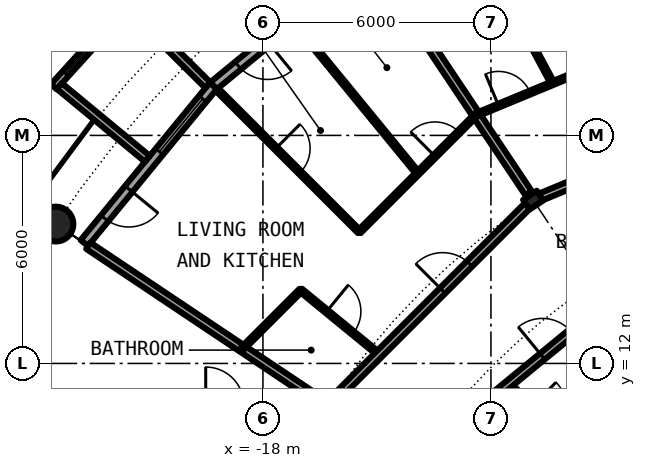
"""IFC4 building model, lengths in metres.
Left out: names, types, materials, properties, quantities, classifications, styles, units other than length and angle.
Written with IfcOpenShell. Run it as: python <this file> out.ifc"""

import sys

from ifc_helpers import new_model, si_unit, direction, frame, frame_2d, origin, origin_2d, place, context, subcontext, project, spatial, rectangle, circle, hollow_circle, i_section, extrude, element, fill, save


model = new_model("IFC4")
c1 = context("Model", 3, precision=1e-05, world=origin(), true_north=direction((0.0, 1.0)))
c2 = subcontext(c1, "Body", "Model", "MODEL_VIEW")
j1 = project(units=[si_unit("LENGTHUNIT", "METRE"), si_unit("PLANEANGLEUNIT", "RADIAN")], contexts=[c1])
p1 = place(None, origin())
s1 = spatial("IfcSite", under=j1, at=p1, CompositionType="ELEMENT")
p2 = place(p1, origin())
s2 = spatial("IfcBuilding", under=s1, at=p2, CompositionType="ELEMENT")
p3 = place(p2, frame((0.0, 0.0, 111.65)))
s3 = spatial("IfcBuildingStorey", under=s2, at=p3, CompositionType="ELEMENT", Elevation=111.65)
p4 = place(p3, frame((-23.448, 15.667, 0.0), z_axis=(0.0, 0.0, 1.0), x_axis=(1.0, 0.0, 0.0)))
e1 = element("IfcColumn", 1, at=p4, inside=s3, PredefinedType="COLUMN", context=c2, shape_type="SweptSolid", body=[
    extrude(hollow_circle(Radius=0.457, WallThickness=0.04, at=origin_2d()), origin(), (0.0, 0.0, 1.0), 3.05),
])
p5 = place(p3, frame((-10.889, 16.297, 0.0), z_axis=(0.0, 0.0, 1.0), x_axis=(-0.55557023302, 0.831469612303, 0.0)))
e2 = element("IfcColumn", 2, at=p5, inside=s3, PredefinedType="COLUMN", context=c2, shape_type="SweptSolid", body=[
    extrude(i_section(OverallWidth=0.307, OverallDepth=0.432, WebThickness=0.021, FlangeThickness=0.04, FilletRadius=0.027, at=origin_2d()), origin(), (0.0, 0.0, 1.0), 3.05),
])
p6 = place(p3, frame((-15.167, 22.699, 0.0), z_axis=(0.0, 0.0, 1.0), x_axis=(-0.773019449054, -0.634382322723, 0.0)))
e3 = element("IfcWall", 3, at=p6, inside=s3, PredefinedType="SOLIDWALL", context=c2, shape_type="SweptSolid", body=[
    extrude(rectangle(XDim=5.352, YDim=0.25, at=frame_2d((2.676, 0.0))), origin(), (0.0, 0.0, 1.0), 2.7),
])
p7 = place(p6, frame((0.441, 0.0, 0.3)))
e4 = element("IfcOpeningElement", 4, at=p7, cuts=e3, PredefinedType="OPENING", context=c2, shape_type="SweptSolid", body=[
    extrude(rectangle(XDim=1.8, YDim=2.1, at=frame_2d((0.9, 1.05))), frame((0.0, 0.135, 0.0), z_axis=(0.0, -1.0, 0.0), x_axis=(1.0, 0.0, 0.0)), (0.0, 0.0, 1.0), 0.27),
])
p8 = place(p6, frame((3.51, 0.0, 0.0)))
e5 = element("IfcOpeningElement", 5, at=p8, cuts=e3, PredefinedType="OPENING", context=c2, shape_type="SweptSolid", body=[
    extrude(rectangle(XDim=1.0, YDim=2.2, at=frame_2d((0.5, 1.1))), frame((0.0, 0.135, 0.0), z_axis=(0.0, -1.0, 0.0), x_axis=(1.0, 0.0, 0.0)), (0.0, 0.0, 1.0), 0.27),
])
p9 = place(p3, frame((-19.304, 19.304, 0.0), z_axis=(0.0, 0.0, 1.0), x_axis=(-0.634382322723, -0.773019449054, 0.0)))
e6 = element("IfcWall", 6, at=p9, inside=s3, PredefinedType="SOLIDWALL", context=c2, shape_type="SweptSolid", body=[
    extrude(rectangle(XDim=5.352, YDim=0.25, at=frame_2d((2.676, 0.0))), origin(), (0.0, 0.0, 1.0), 2.7),
])
p10 = place(p9, frame((0.441, 0.0, 0.3)))
e7 = element("IfcOpeningElement", 7, at=p10, cuts=e6, PredefinedType="OPENING", context=c2, shape_type="SweptSolid", body=[
    extrude(rectangle(XDim=1.8, YDim=2.1, at=frame_2d((0.9, 1.05))), frame((0.0, 0.135, 0.0), z_axis=(0.0, -1.0, 0.0), x_axis=(1.0, 0.0, 0.0)), (0.0, 0.0, 1.0), 0.27),
])
p11 = place(p9, frame((3.51, 0.0, 0.0)))
e8 = element("IfcOpeningElement", 8, at=p11, cuts=e6, PredefinedType="OPENING", context=c2, shape_type="SweptSolid", body=[
    extrude(rectangle(XDim=1.0, YDim=2.2, at=frame_2d((0.5, 1.1))), frame((0.0, 0.135, 0.0), z_axis=(0.0, -1.0, 0.0), x_axis=(1.0, 0.0, 0.0)), (0.0, 0.0, 1.0), 0.27),
])
p12 = place(p3, frame((-21.493, 21.5, -0.03), z_axis=(0.0, 0.0, 1.0), x_axis=(-0.671506829416, -0.740998365753, 0.0)))
e9 = element("IfcWall", 9, at=p12, inside=s3, PredefinedType="SOLIDWALL", context=c2, shape_type="SweptSolid", body=[
    extrude(rectangle(XDim=2.993, YDim=0.2, at=frame_2d((1.497, 0.0))), origin(), (0.0, 0.0, 1.0), 2.73),
])
p13 = place(p12, frame((0.457, 0.0, 0.33)))
e10 = element("IfcOpeningElement", 10, at=p13, cuts=e9, PredefinedType="OPENING", context=c2, shape_type="SweptSolid", body=[
    extrude(circle(Radius=1.04, at=frame_2d((1.04, 1.04))), frame((0.0, 0.11, 0.0), z_axis=(0.0, -1.0, 0.0), x_axis=(1.0, 0.0, 0.0)), (0.0, 0.0, 1.0), 0.22),
])
p14 = place(p3, frame((-19.45, 19.323, -0.03), z_axis=(0.0, 0.0, 1.0), x_axis=(-0.709727076896, 0.704476739375, 0.0)))
e11 = element("IfcWall", 11, at=p14, inside=s3, PredefinedType="SOLIDWALL", context=c2, shape_type="SweptSolid", body=[
    extrude(rectangle(XDim=2.883, YDim=0.2, at=frame_2d((1.441, 0.0))), origin(), (0.0, 0.0, 1.0), 2.73),
])
p15 = place(p3, frame((-21.041, 17.384, -0.03), z_axis=(0.0, 0.0, 1.0), x_axis=(-0.770784861449, 0.63709551667, 0.0)))
e12 = element("IfcWall", 12, at=p15, inside=s3, PredefinedType="SOLIDWALL", context=c2, shape_type="SweptSolid", body=[
    extrude(rectangle(XDim=3.006, YDim=0.2, at=frame_2d((1.503, 0.0))), origin(), (0.0, 0.0, 1.0), 2.73),
])
p16 = place(p3, frame((-22.595, 15.098, 0.0), z_axis=(0.0, 0.0, 1.0), x_axis=(0.831406593008, -0.555664536482, 0.0)))
e13 = element("IfcWall", 13, at=p16, inside=s3, PredefinedType="PARTITIONING", context=c2, shape_type="SweptSolid", body=[
    extrude(rectangle(XDim=7.358, YDim=0.2, at=frame_2d((3.679, 0.0))), origin(), (0.0, 0.0, 1.0), 2.7),
])
p17 = place(p3, frame((-19.216, 19.216, 0.0), z_axis=(0.0, 0.0, 1.0), x_axis=(0.707106781187, -0.707106781187, 0.0)))
e14 = element("IfcWall", 14, at=p17, inside=s3, PredefinedType="PARTITIONING", context=c2, shape_type="SweptSolid", body=[
    extrude(rectangle(XDim=5.305, YDim=0.1, at=frame_2d((2.652, 0.0))), origin(), (0.0, 0.0, 1.0), 2.7),
])
p18 = place(p17, frame((2.202, 0.0, 0.0)))
e15 = element("IfcOpeningElement", 15, at=p18, cuts=e14, PredefinedType="OPENING", context=c2, shape_type="SweptSolid", body=[
    extrude(rectangle(XDim=0.9, YDim=2.3, at=frame_2d((0.45, 1.15))), frame((0.0, 0.06, 0.0), z_axis=(0.0, -1.0, 0.0), x_axis=(1.0, 0.0, 0.0)), (0.0, 0.0, 1.0), 0.12),
])
p19 = place(p3, frame((-17.22, 21.023, 0.0), z_axis=(0.0, 0.0, 1.0), x_axis=(0.633774976367, -0.773517471898, 0.0)))
e16 = element("IfcWall", 16, at=p19, inside=s3, PredefinedType="PARTITIONING", context=c2, shape_type="SweptSolid", body=[
    extrude(rectangle(XDim=5.196, YDim=0.1, at=frame_2d((2.598, 0.0))), origin(), (0.0, 0.0, 1.0), 2.7),
])
p20 = place(p3, frame((-17.004, 13.927, 0.0), z_axis=(0.0, 0.0, 1.0), x_axis=(0.77367517848, -0.633582447834, 0.0)))
e17 = element("IfcWall", 17, at=p20, inside=s3, PredefinedType="PARTITIONING", context=c2, shape_type="SweptSolid", body=[
    extrude(rectangle(XDim=2.661, YDim=0.1, at=frame_2d((1.331, 0.0))), origin(), (0.0, 0.0, 1.0), 2.7),
])
p21 = place(p20, frame((0.881, 0.0, 0.0)))
e18 = element("IfcOpeningElement", 18, at=p21, cuts=e17, PredefinedType="OPENING", context=c2, shape_type="SweptSolid", body=[
    extrude(rectangle(XDim=0.9, YDim=2.3, at=frame_2d((0.45, 1.15))), frame((0.0, 0.06, 0.0), z_axis=(0.0, -1.0, 0.0), x_axis=(1.0, 0.0, 0.0)), (0.0, 0.0, 1.0), 0.12),
])
p22 = place(p3, frame((-15.097, 22.595, 0.0), z_axis=(0.0, 0.0, 1.0), x_axis=(0.555572791, -0.831467903109, 0.0)))
e19 = element("IfcWall", 19, at=p22, inside=s3, PredefinedType="PARTITIONING", context=c2, shape_type="SweptSolid", body=[
    extrude(rectangle(XDim=7.358, YDim=0.2, at=frame_2d((3.679, 0.0))), origin(), (0.0, 0.0, 1.0), 2.7),
])
p23 = place(p3, frame((-12.833, 23.954, 0.0), z_axis=(0.0, 0.0, 1.0), x_axis=(0.472148388886, -0.881519085938, 0.0)))
e20 = element("IfcWall", 20, at=p23, inside=s3, PredefinedType="PARTITIONING", context=c2, shape_type="SweptSolid", body=[
    extrude(rectangle(XDim=5.196, YDim=0.1, at=frame_2d((2.598, 0.0))), origin(), (0.0, 0.0, 1.0), 2.7),
])
p24 = place(p3, frame((-11.524, 11.464, 0.0), z_axis=(0.0, 0.0, 1.0), x_axis=(0.708796844581, -0.705412668665, 0.0)))
e21 = element("IfcWall", 21, at=p24, inside=s3, PredefinedType="PARTITIONING", context=c2, shape_type="SweptSolid", body=[
    extrude(rectangle(XDim=2.597, YDim=0.1, at=frame_2d((1.299, 0.0))), origin(), (0.0, 0.0, 1.0), 2.7),
])
p25 = place(p24, frame((0.849, 0.0, 0.0)))
e22 = element("IfcOpeningElement", 22, at=p25, cuts=e21, PredefinedType="OPENING", context=c2, shape_type="SweptSolid", body=[
    extrude(rectangle(XDim=0.9, YDim=2.3, at=frame_2d((0.45, 1.15))), frame((0.0, 0.06, 0.0), z_axis=(0.0, -1.0, 0.0), x_axis=(1.0, 0.0, 0.0)), (0.0, 0.0, 1.0), 0.12),
])
p26 = place(p3, frame((-14.052, 9.389, 0.0), z_axis=(0.0, 0.0, 1.0), x_axis=(0.77292501819, 0.634497372931, 0.0)))
e23 = element("IfcWall", 23, at=p26, inside=s3, PredefinedType="PARTITIONING", context=c2, shape_type="SweptSolid", body=[
    extrude(rectangle(XDim=9.81, YDim=0.2, at=frame_2d((4.905, 0.0))), origin(), (0.0, 0.0, 1.0), 2.7),
])
p27 = place(p26, frame((4.406, 0.0, 0.0)))
e24 = element("IfcOpeningElement", 24, at=p27, cuts=e23, PredefinedType="OPENING", context=c2, shape_type="SweptSolid", body=[
    extrude(rectangle(XDim=1.0, YDim=2.3, at=frame_2d((0.5, 1.15))), frame((0.0, 0.11, 0.0), z_axis=(0.0, -1.0, 0.0), x_axis=(1.0, 0.0, 0.0)), (0.0, 0.0, 1.0), 0.22),
])
p28 = place(p3, frame((-16.186, 11.0, 0.0), z_axis=(0.0, 0.0, 1.0), x_axis=(0.707106781187, 0.707106781187, 0.0)))
e25 = element("IfcWall", 25, at=p28, inside=s3, PredefinedType="PARTITIONING", context=c2, shape_type="SweptSolid", body=[
    extrude(rectangle(XDim=7.334, YDim=0.2, at=frame_2d((3.667, 0.0))), origin(), (0.0, 0.0, 1.0), 2.39),
])
p29 = place(p28, frame((4.123, 0.0, 0.0)))
e26 = element("IfcOpeningElement", 26, at=p29, cuts=e25, PredefinedType="OPENING", context=c2, shape_type="SweptSolid", body=[
    extrude(rectangle(XDim=1.0, YDim=2.3, at=frame_2d((0.5, 1.15))), frame((0.0, 0.11, 0.0), z_axis=(0.0, -1.0, 0.0), x_axis=(1.0, 0.0, 0.0)), (0.0, 0.0, 1.0), 0.22),
])
p30 = place(p3, frame((-10.745, 16.357, 0.0), z_axis=(0.0, 0.0, 1.0), x_axis=(0.923928411035, 0.382565407848, 0.0)))
e27 = element("IfcWall", 27, at=p30, inside=s3, PredefinedType="PARTITIONING", context=c2, shape_type="SweptSolid", body=[
    extrude(rectangle(XDim=7.335, YDim=0.2, at=frame_2d((3.667, 0.0))), origin(), (0.0, 0.0, 1.0), 2.39),
])
p31 = place(p30, frame((2.212, 0.0, 0.0)))
e28 = element("IfcOpeningElement", 28, at=p31, cuts=e27, PredefinedType="OPENING", context=c2, shape_type="SweptSolid", body=[
    extrude(rectangle(XDim=1.0, YDim=2.3, at=frame_2d((0.5, 1.15))), frame((0.0, 0.11, 0.0), z_axis=(0.0, -1.0, 0.0), x_axis=(1.0, 0.0, 0.0)), (0.0, 0.0, 1.0), 0.22),
])
p32 = place(p3, frame((-18.542, 12.389, 0.0), z_axis=(0.0, 0.0, 1.0), x_axis=(0.707106781187, 0.707106781187, 0.0)))
e29 = element("IfcWall", 29, at=p32, inside=s3, PredefinedType="PARTITIONING", context=c2, shape_type="SweptSolid", body=[
    extrude(rectangle(XDim=2.175, YDim=0.1, at=frame_2d((1.088, 0.0))), origin(), (0.0, 0.0, 1.0), 2.7),
])
p33 = place(p3, frame((-15.465, 15.465, 0.0), z_axis=(0.0, 0.0, 1.0), x_axis=(0.707022606819, 0.707190945535, 0.0)))
e30 = element("IfcWall", 30, at=p33, inside=s3, PredefinedType="PARTITIONING", context=c2, shape_type="SweptSolid", body=[
    extrude(rectangle(XDim=4.351, YDim=0.1, at=frame_2d((2.175, 0.0))), origin(), (0.0, 0.0, 1.0), 2.7),
])
p34 = place(p33, frame((2.813, 0.0, 0.0)))
e31 = element("IfcOpeningElement", 31, at=p34, cuts=e30, PredefinedType="OPENING", context=c2, shape_type="SweptSolid", body=[
    extrude(rectangle(XDim=0.9, YDim=2.3, at=frame_2d((0.45, 1.15))), frame((0.0, 0.06, 0.0), z_axis=(0.0, -1.0, 0.0), x_axis=(1.0, 0.0, 0.0)), (0.0, 0.0, 1.0), 0.12),
])
p35 = place(p3, frame((-12.397, 18.536, 0.0), z_axis=(0.0, 0.0, 1.0), x_axis=(0.923761942059, 0.382967197554, 0.0)))
e32 = element("IfcWall", 32, at=p35, inside=s3, PredefinedType="PARTITIONING", context=c2, shape_type="SweptSolid", body=[
    extrude(rectangle(XDim=4.356, YDim=0.1, at=frame_2d((2.178, 0.0))), origin(), (0.0, 0.0, 1.0), 2.7),
])
p36 = place(p35, frame((0.646, 0.0, 0.0)))
e33 = element("IfcOpeningElement", 33, at=p36, cuts=e32, PredefinedType="OPENING", context=c2, shape_type="SweptSolid", body=[
    extrude(rectangle(XDim=0.9, YDim=2.3, at=frame_2d((0.45, 1.15))), frame((0.0, 0.06, 0.0), z_axis=(0.0, -1.0, 0.0), x_axis=(1.0, 0.0, 0.0)), (0.0, 0.0, 1.0), 0.12),
])
p37 = place(p8, origin())
e34 = element("IfcDoor", 34, at=p37, inside=s3, OperationType="SINGLE_SWING_LEFT", PredefinedType="DOOR", context=c2, shape_type="SweptSolid", body=[
    extrude(rectangle(XDim=1.0, YDim=2.2, at=frame_2d((0.5, 1.1))), frame((0.0, 0.025, 0.0), z_axis=(0.0, -1.0, 0.0), x_axis=(1.0, 0.0, 0.0)), (0.0, 0.0, 1.0), 0.05),
])
fill(e5, e34)
p38 = place(p10, origin())
e35 = element("IfcWindow", 35, at=p38, inside=s3, PartitioningType="SINGLE_PANEL", PredefinedType="WINDOW", context=c2, shape_type="SweptSolid", body=[
    extrude(rectangle(XDim=1.8, YDim=2.1, at=frame_2d((0.9, 1.05))), frame((0.0, 0.03, 0.0), z_axis=(0.0, -1.0, 0.0), x_axis=(1.0, 0.0, 0.0)), (0.0, 0.0, 1.0), 0.06),
])
fill(e7, e35)
p39 = place(p13, origin())
e36 = element("IfcWindow", 36, at=p39, inside=s3, PartitioningType="SINGLE_PANEL", PredefinedType="WINDOW", context=c2, shape_type="SweptSolid", body=[
    extrude(circle(Radius=1.04, at=frame_2d((1.04, 1.04))), frame((0.0, 0.03, 0.0), z_axis=(0.0, -1.0, 0.0), x_axis=(1.0, 0.0, 0.0)), (0.0, 0.0, 1.0), 0.06),
])
fill(e10, e36)
p40 = place(p11, origin())
e37 = element("IfcDoor", 37, at=p40, inside=s3, OperationType="SINGLE_SWING_LEFT", PredefinedType="DOOR", context=c2, shape_type="SweptSolid", body=[
    extrude(rectangle(XDim=1.0, YDim=2.2, at=frame_2d((0.5, 1.1))), frame((0.0, 0.025, 0.0), z_axis=(0.0, -1.0, 0.0), x_axis=(1.0, 0.0, 0.0)), (0.0, 0.0, 1.0), 0.05),
])
fill(e8, e37)
p41 = place(p36, origin())
e38 = element("IfcDoor", 38, at=p41, inside=s3, OperationType="SINGLE_SWING_LEFT", PredefinedType="DOOR", context=c2, shape_type="SweptSolid", body=[
    extrude(rectangle(XDim=0.9, YDim=2.3, at=frame_2d((0.45, 1.15))), frame((0.0, 0.025, 0.0), z_axis=(0.0, -1.0, 0.0), x_axis=(1.0, 0.0, 0.0)), (0.0, 0.0, 1.0), 0.05),
])
fill(e33, e38)
p42 = place(p29, origin())
e39 = element("IfcDoor", 39, at=p42, inside=s3, OperationType="SINGLE_SWING_RIGHT", PredefinedType="DOOR", context=c2, shape_type="SweptSolid", body=[
    extrude(rectangle(XDim=1.0, YDim=2.3, at=frame_2d((0.5, 1.15))), frame((0.0, 0.025, 0.0), z_axis=(0.0, -1.0, 0.0), x_axis=(1.0, 0.0, 0.0)), (0.0, 0.0, 1.0), 0.05),
])
fill(e26, e39)
p43 = place(p21, origin())
e40 = element("IfcDoor", 40, at=p43, inside=s3, OperationType="SINGLE_SWING_RIGHT", PredefinedType="DOOR", context=c2, shape_type="SweptSolid", body=[
    extrude(rectangle(XDim=0.9, YDim=2.3, at=frame_2d((0.45, 1.15))), frame((0.0, 0.025, 0.0), z_axis=(0.0, -1.0, 0.0), x_axis=(1.0, 0.0, 0.0)), (0.0, 0.0, 1.0), 0.05),
])
fill(e18, e40)
p44 = place(p18, origin())
e41 = element("IfcDoor", 41, at=p44, inside=s3, OperationType="SINGLE_SWING_LEFT", PredefinedType="DOOR", context=c2, shape_type="SweptSolid", body=[
    extrude(rectangle(XDim=0.9, YDim=2.3, at=frame_2d((0.45, 1.15))), frame((0.0, 0.025, 0.0), z_axis=(0.0, -1.0, 0.0), x_axis=(1.0, 0.0, 0.0)), (0.0, 0.0, 1.0), 0.05),
])
fill(e15, e41)
p45 = place(p34, origin())
e42 = element("IfcDoor", 42, at=p45, inside=s3, OperationType="SINGLE_SWING_RIGHT", PredefinedType="DOOR", context=c2, shape_type="SweptSolid", body=[
    extrude(rectangle(XDim=0.9, YDim=2.3, at=frame_2d((0.45, 1.15))), frame((0.0, 0.025, 0.0), z_axis=(0.0, -1.0, 0.0), x_axis=(1.0, 0.0, 0.0)), (0.0, 0.0, 1.0), 0.05),
])
fill(e31, e42)
p46 = place(p27, origin())
e43 = element("IfcDoor", 43, at=p46, inside=s3, OperationType="SINGLE_SWING_RIGHT", PredefinedType="DOOR", context=c2, shape_type="SweptSolid", body=[
    extrude(rectangle(XDim=1.0, YDim=2.3, at=frame_2d((0.5, 1.15))), frame((0.0, 0.025, 0.0), z_axis=(0.0, -1.0, 0.0), x_axis=(1.0, 0.0, 0.0)), (0.0, 0.0, 1.0), 0.05),
])
fill(e24, e43)
save(model, sys.argv[1])
